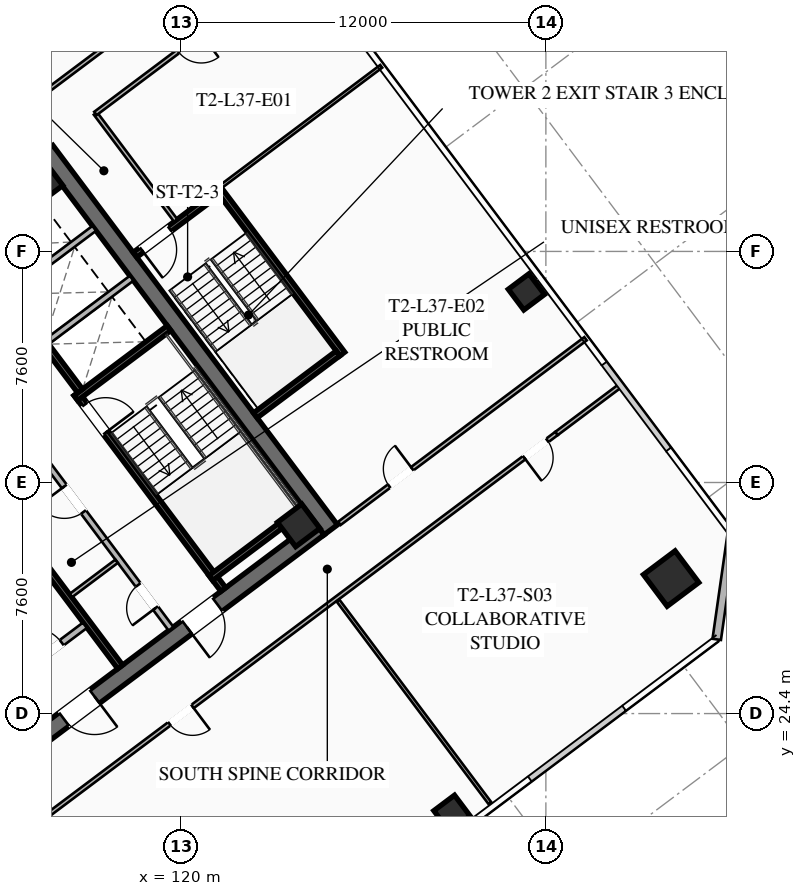
"""IFC4 building model, lengths in metres.
Left out: names, types, materials, properties, quantities, classifications, styles, units other than length and angle.
Written with IfcOpenShell. Run it as: python <this file> out.ifc"""

import sys

from ifc_helpers import new_model, si_unit, direction, frame, frame_2d, origin, origin_2d, place, context, subcontext, project, spatial, rectangle, hollow_rectangle, extrude, element, fill, save


model = new_model("IFC4")
c1 = context("Model", 3, precision=1e-05, world=origin(), true_north=direction((0.0, 1.0)))
c2 = subcontext(c1, "Body", "Model", "MODEL_VIEW")
j1 = project(units=[si_unit("LENGTHUNIT", "METRE"), si_unit("PLANEANGLEUNIT", "RADIAN")], contexts=[c1])
p1 = place(None, origin())
s1 = spatial("IfcSite", under=j1, at=p1, CompositionType="ELEMENT")
p2 = place(p1, origin())
s2 = spatial("IfcBuilding", under=s1, at=p2, CompositionType="ELEMENT")
p3 = place(p2, frame((0.0, 0.0, 139.25)))
s3 = spatial("IfcBuildingStorey", under=s2, at=p3, CompositionType="ELEMENT", Elevation=139.25)
p4 = place(p3, frame((115.564, 42.923, 0.0), z_axis=(0.0, 0.0, 1.0), x_axis=(0.600005007985, -0.799996243986, 0.0)))
e1 = element("IfcWall", 1, at=p4, inside=s3, PredefinedType="SHEAR", context=c2, shape_type="SweptSolid", body=[
    extrude(rectangle(XDim=15.6, YDim=0.55, at=frame_2d((7.8, 0.0))), origin(), (0.0, 0.0, 1.0), 3.55),
])
p5 = place(p3, frame((124.539, 30.498, 0.0), z_axis=(0.0, 0.0, 1.0), x_axis=(-0.799998054672, -0.600002593761, 0.0)))
e2 = element("IfcWall", 2, at=p5, inside=s3, PredefinedType="SHEAR", context=c2, shape_type="SweptSolid", body=[
    extrude(rectangle(XDim=15.06, YDim=0.55, at=frame_2d((7.53, 0.0))), origin(), (0.0, 0.0, 1.0), 3.55),
])
p6 = place(p5, frame((9.23, 0.0, 0.0)))
e3 = element("IfcOpeningElement", 3, at=p6, cuts=e2, PredefinedType="OPENING", context=c2, shape_type="SweptSolid", body=[
    extrude(rectangle(XDim=1.25, YDim=2.25, at=frame_2d((0.625, 1.125))), frame((0.0, 0.285, 0.0), z_axis=(0.0, -1.0, 0.0), x_axis=(1.0, 0.0, 0.0)), (0.0, 0.0, 1.0), 0.57),
])
p7 = place(p5, frame((4.18, 0.0, 0.0)))
e4 = element("IfcOpeningElement", 4, at=p7, cuts=e2, PredefinedType="OPENING", context=c2, shape_type="SweptSolid", body=[
    extrude(rectangle(XDim=1.25, YDim=2.25, at=frame_2d((0.625, 1.125))), frame((0.0, 0.285, 0.0), z_axis=(0.0, -1.0, 0.0), x_axis=(1.0, 0.0, 0.0)), (0.0, 0.0, 1.0), 0.57),
])
for number, where, z_axis, x_axis in (
    (5, (123.87, 30.59, 0.0), (0.0, 0.0, 1.0), (0.8, 0.6, 0.0)),
    (6, (115.41, 41.87, 0.0), (0.0, 0.0, 1.0), (0.8, 0.6, 0.0)),
):
    element("IfcColumn", number, at=place(p3, frame(where, z_axis=z_axis, x_axis=x_axis)), inside=s3, PredefinedType="COLUMN", context=c2, shape_type="SweptSolid", body=[
        extrude(hollow_rectangle(XDim=1.0, YDim=1.0, WallThickness=0.04, at=origin_2d()), origin(), (0.0, 0.0, 1.0), 3.37),
    ])
p8 = place(p3, frame((136.12, 28.84, 0.0), z_axis=(0.0, 0.0, 1.0), x_axis=(0.799999996291, 0.600000004945, 0.0)))
e7 = element("IfcColumn", 7, at=p8, inside=s3, PredefinedType="COLUMN", context=c2, shape_type="SweptSolid", body=[
    extrude(hollow_rectangle(XDim=1.3, YDim=1.3, WallThickness=0.05, at=origin_2d()), origin(), (0.0, 0.0, 1.0), 3.37),
])
for number, where, z_axis, x_axis in (
    (8, (128.91, 21.12, 0.0), (0.0, 0.0, 1.0), (0.8, 0.6, 0.0)),
    (9, (131.36, 38.27, 0.0), (0.0, 0.0, 1.0), (0.8, 0.6, 0.0)),
):
    element("IfcColumn", number, at=place(p3, frame(where, z_axis=z_axis, x_axis=x_axis)), inside=s3, PredefinedType="COLUMN", context=c2, shape_type="SweptSolid", body=[
        extrude(hollow_rectangle(XDim=0.85, YDim=0.85, WallThickness=0.035, at=origin_2d()), origin(), (0.0, 0.0, 1.0), 3.37),
    ])
p9 = place(p3, frame((138.12, 30.34, 0.0), z_axis=(0.0, 0.0, 1.0), x_axis=(-0.141421356237, -0.989949493661, 0.0)))
e10 = element("IfcWall", 10, at=p9, inside=s3, PredefinedType="SOLIDWALL", context=c2, shape_type="SweptSolid", body=[
    extrude(rectangle(XDim=3.536, YDim=0.28, at=frame_2d((1.768, 0.0))), origin(), (0.0, 0.0, 1.0), 3.37),
])
p10 = place(p3, frame((116.56, 34.92, 0.0), z_axis=(0.0, 0.0, 1.0), x_axis=(0.59999029481, -0.8000072788, 0.0)))
e11 = element("IfcWall", 11, at=p10, inside=s3, PredefinedType="SHEAR", context=c2, shape_type="SweptSolid", body=[
    extrude(rectangle(XDim=8.05, YDim=0.2, at=frame_2d((4.025, 0.0))), origin(), (0.0, 0.0, 1.0), 3.37),
])
p11 = place(p10, frame((0.45, 0.0, 0.0)))
e12 = element("IfcOpeningElement", 12, at=p11, cuts=e11, PredefinedType="OPENING", context=c2, shape_type="SweptSolid", body=[
    extrude(rectangle(XDim=1.15, YDim=2.2, at=frame_2d((0.575, 1.1))), frame((0.0, 0.11, 0.0), z_axis=(0.0, -1.0, 0.0), x_axis=(1.0, 0.0, 0.0)), (0.0, 0.0, 1.0), 0.22),
])
for number, where, z_axis, x_axis in (
    (13, (116.54, 34.78, 0.0), (0.0, 0.0, 1.0), (0.8, 0.6, 0.0)),
    (14, (120.98, 28.86, 0.0), (0.0, 0.0, 1.0), (0.8, 0.6, 0.0)),
):
    element("IfcWall", number, at=place(p3, frame(where, z_axis=z_axis, x_axis=x_axis)), inside=s3, PredefinedType="SHEAR", context=c2, shape_type="SweptSolid", body=[
        extrude(rectangle(XDim=3.83, YDim=0.2, at=frame_2d((1.915, 0.0))), origin(), (0.0, 0.0, 1.0), 3.37),
    ])
p12 = place(p3, frame((117.998, 25.936, 0.0), z_axis=(0.0, 0.0, 1.0), x_axis=(-0.600002693989, 0.799997979501, 0.0)))
e15 = element("IfcWall", 15, at=p12, inside=s3, PredefinedType="SHEAR", context=c2, shape_type="SweptSolid", body=[
    extrude(rectangle(XDim=14.5, YDim=0.2, at=frame_2d((7.25, 0.0))), origin(), (0.0, 0.0, 1.0), 3.37),
])
p13 = place(p3, frame((114.316, 25.412, 0.0), z_axis=(0.0, 0.0, 1.0), x_axis=(0.800018601094, 0.59997519774, 0.0)))
e16 = element("IfcWall", 16, at=p13, inside=s3, PredefinedType="SOLIDWALL", context=c2, shape_type="SweptSolid", body=[
    extrude(rectangle(XDim=3.15, YDim=0.22, at=frame_2d((1.575, 0.0))), origin(), (0.0, 0.0, 1.0), 2.723),
])
p14 = place(p13, frame((0.95, 0.0, 0.0)))
e17 = element("IfcOpeningElement", 17, at=p14, cuts=e16, PredefinedType="OPENING", context=c2, shape_type="SweptSolid", body=[
    extrude(rectangle(XDim=1.25, YDim=2.25, at=frame_2d((0.625, 1.125))), frame((0.0, 0.12, 0.0), z_axis=(0.0, -1.0, 0.0), x_axis=(1.0, 0.0, 0.0)), (0.0, 0.0, 1.0), 0.24),
])
p15 = place(p3, frame((112.81, 40.17, 0.0), z_axis=(0.0, 0.0, 1.0), x_axis=(0.599993943644, -0.800004542231, 0.0)))
e18 = element("IfcWall", 18, at=p15, inside=s3, PredefinedType="SHEAR", context=c2, shape_type="SweptSolid", body=[
    extrude(rectangle(XDim=6.45, YDim=0.2, at=frame_2d((3.225, 0.0))), origin(), (0.0, 0.0, 1.0), 3.37),
])
for number, where, z_axis, x_axis in (
    (19, (115.59, 36.63, 0.0), (0.0, 0.0, 1.0), (0.8, 0.6, 0.0)),
    (20, (114.36, 38.27, 0.0), (0.0, 0.0, 1.0), (0.8, 0.6, 0.0)),
):
    element("IfcWall", number, at=place(p3, frame(where, z_axis=z_axis, x_axis=x_axis)), inside=s3, PredefinedType="SOLIDWALL", context=c2, shape_type="SweptSolid", body=[
        extrude(rectangle(XDim=3.48, YDim=0.2, at=frame_2d((1.74, 0.0))), origin(), (0.0, 0.0, 1.0), 3.37),
    ])
p16 = place(p3, frame((119.67, 27.19, 0.0), z_axis=(0.0, 0.0, 1.0), x_axis=(-0.599988677396, 0.800008491828, 0.0)))
e21 = element("IfcWall", 21, at=p16, inside=s3, PredefinedType="SOLIDWALL", context=c2, shape_type="SweptSolid", body=[
    extrude(rectangle(XDim=6.9, YDim=0.2, at=frame_2d((3.45, 0.0))), origin(), (0.0, 0.0, 1.0), 2.723),
])
p17 = place(p16, frame((0.85, 0.0, 0.0)))
e22 = element("IfcOpeningElement", 22, at=p17, cuts=e21, PredefinedType="OPENING", context=c2, shape_type="SweptSolid", body=[
    extrude(rectangle(XDim=0.95, YDim=2.05, at=frame_2d((0.475, 1.025))), frame((0.0, 0.11, 0.0), z_axis=(0.0, -1.0, 0.0), x_axis=(1.0, 0.0, 0.0)), (0.0, 0.0, 1.0), 0.22),
])
p18 = place(p16, frame((4.8, 0.0, 0.0)))
e23 = element("IfcOpeningElement", 23, at=p18, cuts=e21, PredefinedType="OPENING", context=c2, shape_type="SweptSolid", body=[
    extrude(rectangle(XDim=1.05, YDim=2.2, at=frame_2d((0.525, 1.1))), frame((0.0, 0.11, 0.0), z_axis=(0.0, -1.0, 0.0), x_axis=(1.0, 0.0, 0.0)), (0.0, 0.0, 1.0), 0.22),
])
p19 = place(p3, frame((116.376, 28.282, 0.0), z_axis=(0.0, 0.0, 1.0), x_axis=(0.8, 0.6, 0.0)))
e24 = element("IfcWall", 24, at=p19, inside=s3, PredefinedType="PARTITIONING", context=c2, shape_type="SweptSolid", body=[
    extrude(rectangle(XDim=1.88, YDim=0.135, at=frame_2d((0.94, 0.0))), origin(), (0.0, 0.0, 1.0), 2.723),
])
p20 = place(p3, frame((125.304, 36.228, 0.0), z_axis=(0.0, 0.0, 1.0), x_axis=(-0.59998851072, 0.800008616831, 0.0)))
e25 = element("IfcWall", 25, at=p20, inside=s3, PredefinedType="SHEAR", context=c2, shape_type="SweptSolid", body=[
    extrude(rectangle(XDim=6.8, YDim=0.2, at=frame_2d((3.4, 0.0))), origin(), (0.0, 0.0, 1.0), 3.37),
])
p21 = place(p3, frame((121.204, 41.528, 0.0), z_axis=(0.0, 0.0, 1.0), x_axis=(-0.800017232136, -0.599977023131, 0.0)))
e26 = element("IfcWall", 26, at=p21, inside=s3, PredefinedType="SHEAR", context=c2, shape_type="SweptSolid", body=[
    extrude(rectangle(XDim=3.4, YDim=0.2, at=frame_2d((1.7, 0.0))), origin(), (0.0, 0.0, 1.0), 3.37),
])
p22 = place(p21, frame((1.975, 0.0, 0.0)))
e27 = element("IfcOpeningElement", 27, at=p22, cuts=e26, PredefinedType="OPENING", context=c2, shape_type="SweptSolid", body=[
    extrude(rectangle(XDim=1.15, YDim=2.2, at=frame_2d((0.575, 1.1))), frame((0.0, 0.11, 0.0), z_axis=(0.0, -1.0, 0.0), x_axis=(1.0, 0.0, 0.0)), (0.0, 0.0, 1.0), 0.22),
])
p23 = place(p3, frame((122.444, 34.208, 0.0), z_axis=(0.0, 0.0, 1.0), x_axis=(0.79999138319, 0.600011488909, 0.0)))
e28 = element("IfcWall", 28, at=p23, inside=s3, PredefinedType="SHEAR", context=c2, shape_type="SweptSolid", body=[
    extrude(rectangle(XDim=3.4, YDim=0.2, at=frame_2d((1.7, 0.0))), origin(), (0.0, 0.0, 1.0), 3.37),
])
p24 = place(p3, frame((119.824, 40.618, 0.0), z_axis=(0.0, 0.0, 1.0), x_axis=(-0.599982243973, 0.800013316712, 0.0)))
e29 = element("IfcWall", 29, at=p24, inside=s3, PredefinedType="PARTITIONING", context=c2, shape_type="SweptSolid", body=[
    extrude(rectangle(XDim=4.4, YDim=0.135, at=frame_2d((2.2, 0.0))), origin(), (0.0, 0.0, 1.0), 2.723),
])
p25 = place(p3, frame((95.87, 30.09, 0.0), z_axis=(0.0, 0.0, 1.0), x_axis=(0.799997191971, 0.600003744021, 0.0)))
e30 = element("IfcWall", 30, at=p25, inside=s3, PredefinedType="PARTITIONING", context=c2, shape_type="SweptSolid", body=[
    extrude(rectangle(XDim=31.3, YDim=0.135, at=frame_2d((15.65, 0.0))), origin(), (0.0, 0.0, 1.0), 2.723),
])
p26 = place(p25, frame((0.3, 0.0, 0.0)))
e31 = element("IfcOpeningElement", 31, at=p26, cuts=e30, PredefinedType="OPENING", context=c2, shape_type="SweptSolid", body=[
    extrude(rectangle(XDim=0.95, YDim=2.05, at=frame_2d((0.475, 1.025))), frame((0.0, 0.077, 0.0), z_axis=(0.0, -1.0, 0.0), x_axis=(1.0, 0.0, 0.0)), (0.0, 0.0, 1.0), 0.155),
])
p27 = place(p25, frame((11.12, 0.0, 0.0)))
e32 = element("IfcOpeningElement", 32, at=p27, cuts=e30, PredefinedType="OPENING", context=c2, shape_type="SweptSolid", body=[
    extrude(rectangle(XDim=0.95, YDim=2.05, at=frame_2d((0.475, 1.025))), frame((0.0, 0.077, 0.0), z_axis=(0.0, -1.0, 0.0), x_axis=(1.0, 0.0, 0.0)), (0.0, 0.0, 1.0), 0.155),
])
p28 = place(p25, frame((15.423, 0.0, 0.0)))
e33 = element("IfcOpeningElement", 33, at=p28, cuts=e30, PredefinedType="OPENING", context=c2, shape_type="SweptSolid", body=[
    extrude(rectangle(XDim=0.95, YDim=2.05, at=frame_2d((0.475, 1.025))), frame((0.0, 0.077, 0.0), z_axis=(0.0, -1.0, 0.0), x_axis=(1.0, 0.0, 0.0)), (0.0, 0.0, 1.0), 0.155),
])
p29 = place(p25, frame((19.228, 0.0, 0.0)))
e34 = element("IfcOpeningElement", 34, at=p29, cuts=e30, PredefinedType="OPENING", context=c2, shape_type="SweptSolid", body=[
    extrude(rectangle(XDim=0.95, YDim=2.05, at=frame_2d((0.475, 1.025))), frame((0.0, 0.077, 0.0), z_axis=(0.0, -1.0, 0.0), x_axis=(1.0, 0.0, 0.0)), (0.0, 0.0, 1.0), 0.155),
])
p30 = place(p25, frame((30.05, 0.0, 0.0)))
e35 = element("IfcOpeningElement", 35, at=p30, cuts=e30, PredefinedType="OPENING", context=c2, shape_type="SweptSolid", body=[
    extrude(rectangle(XDim=0.95, YDim=2.05, at=frame_2d((0.475, 1.025))), frame((0.0, 0.077, 0.0), z_axis=(0.0, -1.0, 0.0), x_axis=(1.0, 0.0, 0.0)), (0.0, 0.0, 1.0), 0.155),
])
p31 = place(p3, frame((132.352, 33.614, 0.0), z_axis=(0.0, 0.0, 1.0), x_axis=(-0.8, -0.6, 0.0)))
e36 = element("IfcWall", 36, at=p31, inside=s3, PredefinedType="PARTITIONING", context=c2, shape_type="SweptSolid", body=[
    extrude(rectangle(XDim=31.3, YDim=0.135, at=frame_2d((15.65, 0.0))), origin(), (0.0, 0.0, 1.0), 2.723),
])
p32 = place(p31, frame((29.97, 0.0, 0.0)))
e37 = element("IfcOpeningElement", 37, at=p32, cuts=e36, PredefinedType="OPENING", context=c2, shape_type="SweptSolid", body=[
    extrude(rectangle(XDim=0.95, YDim=2.05, at=frame_2d((0.475, 1.025))), frame((0.0, 0.077, 0.0), z_axis=(0.0, -1.0, 0.0), x_axis=(1.0, 0.0, 0.0)), (0.0, 0.0, 1.0), 0.155),
])
p33 = place(p31, frame((14.968, 0.0, 0.0)))
e38 = element("IfcOpeningElement", 38, at=p33, cuts=e36, PredefinedType="OPENING", context=c2, shape_type="SweptSolid", body=[
    extrude(rectangle(XDim=0.95, YDim=2.05, at=frame_2d((0.475, 1.025))), frame((0.0, 0.077, 0.0), z_axis=(0.0, -1.0, 0.0), x_axis=(1.0, 0.0, 0.0)), (0.0, 0.0, 1.0), 0.155),
])
p34 = place(p31, frame((0.38, 0.0, 0.0)))
e39 = element("IfcOpeningElement", 39, at=p34, cuts=e36, PredefinedType="OPENING", context=c2, shape_type="SweptSolid", body=[
    extrude(rectangle(XDim=0.95, YDim=2.05, at=frame_2d((0.475, 1.025))), frame((0.0, 0.077, 0.0), z_axis=(0.0, -1.0, 0.0), x_axis=(1.0, 0.0, 0.0)), (0.0, 0.0, 1.0), 0.155),
])
p35 = place(p3, frame((132.352, 33.614, 0.0), z_axis=(0.0, 0.0, 1.0), x_axis=(0.80002227902, 0.599970293491, 0.0)))
e40 = element("IfcWall", 40, at=p35, inside=s3, PredefinedType="PARTITIONING", context=c2, shape_type="SweptSolid", body=[
    extrude(rectangle(XDim=2.63, YDim=0.135, at=frame_2d((1.315, 0.0))), origin(), (0.0, 0.0, 1.0), 2.723),
])
p36 = place(p3, frame((130.158, 21.456, 0.0), z_axis=(0.0, 0.0, 1.0), x_axis=(-0.6, 0.8, 0.0)))
e41 = element("IfcWall", 41, at=p36, inside=s3, PredefinedType="PARTITIONING", context=c2, shape_type="SweptSolid", body=[
    extrude(rectangle(XDim=8.33, YDim=0.11, at=frame_2d((4.165, 0.0))), origin(), (0.0, 0.0, 1.0), 2.723),
])
p37 = place(p3, frame((123.944, 49.208, 0.0), z_axis=(0.0, 0.0, 1.0), x_axis=(-0.799996532921, -0.600004622744, 0.0)))
e42 = element("IfcWall", 42, at=p37, inside=s3, PredefinedType="PARTITIONING", context=c2, shape_type="SweptSolid", body=[
    extrude(rectangle(XDim=8.45, YDim=0.135, at=frame_2d((4.225, 0.0))), origin(), (0.0, 0.0, 1.0), 2.723),
])
p38 = place(p37, frame((4.1, 0.0, 0.0)))
e43 = element("IfcOpeningElement", 43, at=p38, cuts=e42, PredefinedType="OPENING", context=c2, shape_type="SweptSolid", body=[
    extrude(rectangle(XDim=0.95, YDim=2.05, at=frame_2d((0.475, 1.025))), frame((0.0, 0.077, 0.0), z_axis=(0.0, -1.0, 0.0), x_axis=(1.0, 0.0, 0.0)), (0.0, 0.0, 1.0), 0.155),
])
p39 = place(p3, frame((125.208, 30.656, 0.0), z_axis=(0.0, 0.0, 1.0), x_axis=(0.799997105034, 0.600003859935, 0.0)))
e44 = element("IfcWall", 44, at=p39, inside=s3, PredefinedType="PARTITIONING", context=c2, shape_type="SweptSolid", body=[
    extrude(rectangle(XDim=10.12, YDim=0.135, at=frame_2d((5.06, 0.0))), origin(), (0.0, 0.0, 1.0), 2.723),
])
p40 = place(p39, frame((2.045, 0.0, 0.0)))
e45 = element("IfcOpeningElement", 45, at=p40, cuts=e44, PredefinedType="OPENING", context=c2, shape_type="SweptSolid", body=[
    extrude(rectangle(XDim=0.95, YDim=2.05, at=frame_2d((0.475, 1.025))), frame((0.0, 0.077, 0.0), z_axis=(0.0, -1.0, 0.0), x_axis=(1.0, 0.0, 0.0)), (0.0, 0.0, 1.0), 0.155),
])
p41 = place(p3, frame((126.584, 45.688, 0.0), z_axis=(0.0, 0.0, 1.0), x_axis=(-0.800004438899, -0.599994081423, 0.0)))
e46 = element("IfcWall", 46, at=p41, inside=s3, PredefinedType="PARTITIONING", context=c2, shape_type="SweptSolid", body=[
    extrude(rectangle(XDim=6.6, YDim=0.11, at=frame_2d((3.3, 0.0))), origin(), (0.0, 0.0, 1.0), 2.723),
])
p42 = place(p6, origin())
e47 = element("IfcDoor", 47, at=p42, inside=s3, OperationType="SINGLE_SWING_LEFT", PredefinedType="DOOR", context=c2, shape_type="SweptSolid", body=[
    extrude(rectangle(XDim=1.25, YDim=2.25, at=frame_2d((0.625, 1.125))), frame((0.0, 0.025, 0.0), z_axis=(0.0, -1.0, 0.0), x_axis=(1.0, 0.0, 0.0)), (0.0, 0.0, 1.0), 0.05),
])
fill(e3, e47)
p43 = place(p7, origin())
e48 = element("IfcDoor", 48, at=p43, inside=s3, OperationType="SINGLE_SWING_RIGHT", PredefinedType="DOOR", context=c2, shape_type="SweptSolid", body=[
    extrude(rectangle(XDim=1.25, YDim=2.25, at=frame_2d((0.625, 1.125))), frame((0.0, 0.025, 0.0), z_axis=(0.0, -1.0, 0.0), x_axis=(1.0, 0.0, 0.0)), (0.0, 0.0, 1.0), 0.05),
])
fill(e4, e48)
p44 = place(p11, origin())
e49 = element("IfcDoor", 49, at=p44, inside=s3, OperationType="SINGLE_SWING_RIGHT", PredefinedType="DOOR", context=c2, shape_type="SweptSolid", body=[
    extrude(rectangle(XDim=1.15, YDim=2.2, at=frame_2d((0.575, 1.1))), frame((0.0, 0.025, 0.0), z_axis=(0.0, -1.0, 0.0), x_axis=(1.0, 0.0, 0.0)), (0.0, 0.0, 1.0), 0.05),
])
fill(e12, e49)
p45 = place(p14, origin())
e50 = element("IfcDoor", 50, at=p45, inside=s3, OperationType="SINGLE_SWING_LEFT", PredefinedType="DOOR", context=c2, shape_type="SweptSolid", body=[
    extrude(rectangle(XDim=1.25, YDim=2.25, at=frame_2d((0.625, 1.125))), frame((0.0, 0.025, 0.0), z_axis=(0.0, -1.0, 0.0), x_axis=(1.0, 0.0, 0.0)), (0.0, 0.0, 1.0), 0.05),
])
fill(e17, e50)
p46 = place(p17, origin())
e51 = element("IfcDoor", 51, at=p46, inside=s3, OperationType="SINGLE_SWING_LEFT", PredefinedType="DOOR", context=c2, shape_type="SweptSolid", body=[
    extrude(rectangle(XDim=0.95, YDim=2.05, at=frame_2d((0.475, 1.025))), frame((0.0, 0.025, 0.0), z_axis=(0.0, -1.0, 0.0), x_axis=(1.0, 0.0, 0.0)), (0.0, 0.0, 1.0), 0.05),
])
fill(e22, e51)
p47 = place(p18, origin())
e52 = element("IfcDoor", 52, at=p47, inside=s3, OperationType="SINGLE_SWING_RIGHT", PredefinedType="DOOR", context=c2, shape_type="SweptSolid", body=[
    extrude(rectangle(XDim=1.05, YDim=2.2, at=frame_2d((0.525, 1.1))), frame((0.0, 0.025, 0.0), z_axis=(0.0, -1.0, 0.0), x_axis=(1.0, 0.0, 0.0)), (0.0, 0.0, 1.0), 0.05),
])
fill(e23, e52)
p48 = place(p22, origin())
e53 = element("IfcDoor", 53, at=p48, inside=s3, OperationType="SINGLE_SWING_RIGHT", PredefinedType="DOOR", context=c2, shape_type="SweptSolid", body=[
    extrude(rectangle(XDim=1.15, YDim=2.2, at=frame_2d((0.575, 1.1))), frame((0.0, 0.025, 0.0), z_axis=(0.0, -1.0, 0.0), x_axis=(1.0, 0.0, 0.0)), (0.0, 0.0, 1.0), 0.05),
])
fill(e27, e53)
p49 = place(p33, origin())
e54 = element("IfcDoor", 54, at=p49, inside=s3, OperationType="SINGLE_SWING_LEFT", PredefinedType="DOOR", context=c2, shape_type="SweptSolid", body=[
    extrude(rectangle(XDim=0.95, YDim=2.05, at=frame_2d((0.475, 1.025))), frame((0.0, 0.025, 0.0), z_axis=(0.0, -1.0, 0.0), x_axis=(1.0, 0.0, 0.0)), (0.0, 0.0, 1.0), 0.05),
])
fill(e38, e54)
p50 = place(p34, origin())
e55 = element("IfcDoor", 55, at=p50, inside=s3, OperationType="SINGLE_SWING_RIGHT", PredefinedType="DOOR", context=c2, shape_type="SweptSolid", body=[
    extrude(rectangle(XDim=0.95, YDim=2.05, at=frame_2d((0.475, 1.025))), frame((0.0, 0.025, 0.0), z_axis=(0.0, -1.0, 0.0), x_axis=(1.0, 0.0, 0.0)), (0.0, 0.0, 1.0), 0.05),
])
fill(e39, e55)
p51 = place(p40, origin())
e56 = element("IfcDoor", 56, at=p51, inside=s3, OperationType="SINGLE_SWING_RIGHT", PredefinedType="DOOR", context=c2, shape_type="SweptSolid", body=[
    extrude(rectangle(XDim=0.95, YDim=2.05, at=frame_2d((0.475, 1.025))), frame((0.0, 0.025, 0.0), z_axis=(0.0, -1.0, 0.0), x_axis=(1.0, 0.0, 0.0)), (0.0, 0.0, 1.0), 0.05),
])
fill(e45, e56)
save(model, sys.argv[1])
